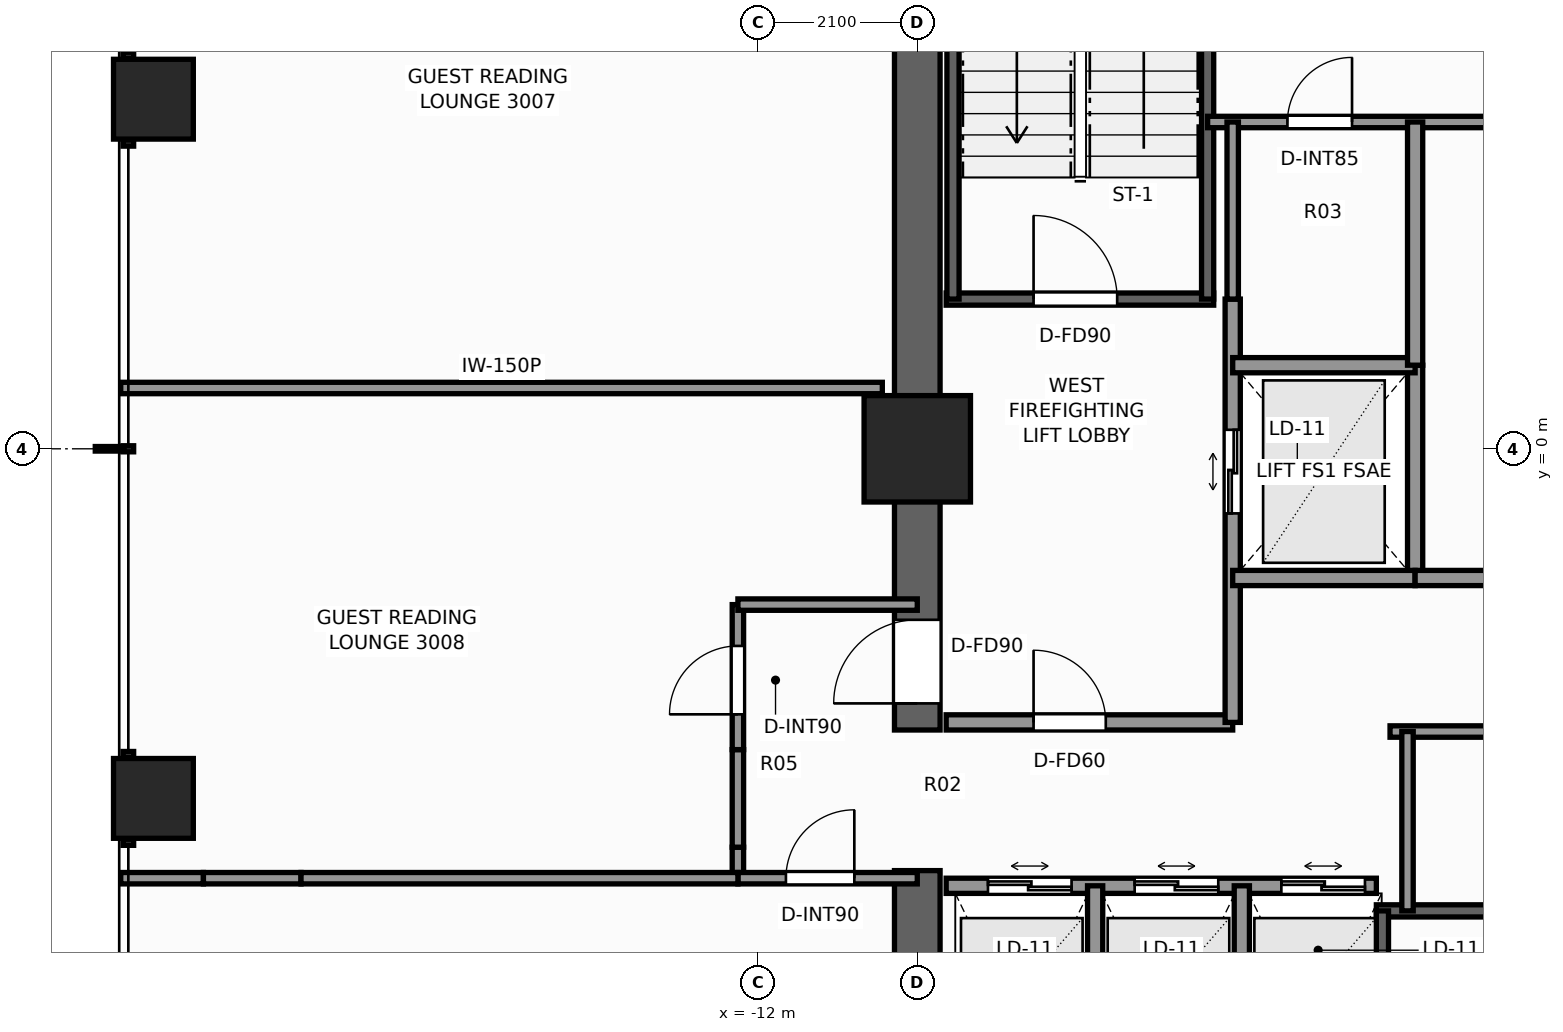
"""IFC4 building model, lengths in metres.
Left out: names, types, materials, properties, quantities, classifications, styles, units other than length and angle.
Written with IfcOpenShell. Run it as: python <this file> out.ifc"""

import sys

from ifc_helpers import new_model, si_unit, direction, frame, frame_2d, origin, origin_2d, place, context, subcontext, project, spatial, rectangle, extrude, element, fill, save


model = new_model("IFC4")
c1 = context("Model", 3, precision=1e-05, world=origin(), true_north=direction((0.0, 1.0)))
c2 = subcontext(c1, "Body", "Model", "MODEL_VIEW")
j1 = project(units=[si_unit("LENGTHUNIT", "METRE"), si_unit("PLANEANGLEUNIT", "RADIAN")], contexts=[c1])
p1 = place(None, origin())
s1 = spatial("IfcSite", under=j1, at=p1, CompositionType="ELEMENT")
p2 = place(p1, origin())
s2 = spatial("IfcBuilding", under=s1, at=p2, CompositionType="ELEMENT")
p3 = place(p2, frame((0.0, 0.0, 105.2)))
s3 = spatial("IfcBuildingStorey", under=s2, at=p3, CompositionType="ELEMENT", Elevation=105.2)
p4 = place(p3, frame((-9.9, -9.6, 0.0), z_axis=(0.0, 0.0, 1.0), x_axis=(0.0, 1.0, 0.0)))
e1 = element("IfcWall", 1, at=p4, inside=s3, PredefinedType="SHEAR", context=c2, shape_type="SweptSolid", body=[
    extrude(rectangle(XDim=4.05, YDim=0.6, at=frame_2d((2.025, 0.0))), origin(), (0.0, 0.0, 1.0), 3.3),
])
p5 = place(p3, frame((-9.9, -3.7, 0.0), z_axis=(0.0, 0.0, 1.0), x_axis=(0.0, 1.0, 0.0)))
e2 = element("IfcWall", 2, at=p5, inside=s3, PredefinedType="SHEAR", context=c2, shape_type="SweptSolid", body=[
    extrude(rectangle(XDim=13.3, YDim=0.6, at=frame_2d((6.65, 0.0))), origin(), (0.0, 0.0, 1.0), 3.3),
])
p6 = place(p5, frame((0.35, 0.0, 0.0)))
e3 = element("IfcOpeningElement", 3, at=p6, cuts=e2, PredefinedType="OPENING", context=c2, shape_type="SweptSolid", body=[
    extrude(rectangle(XDim=1.1, YDim=2.2, at=frame_2d((0.55, 1.1))), frame((0.0, 0.31, 0.0), z_axis=(0.0, -1.0, 0.0), x_axis=(1.0, 0.0, 0.0)), (0.0, 0.0, 1.0), 0.62),
])
p7 = place(p3, frame((-9.9, 0.0, 0.0), z_axis=(0.0, 0.0, 1.0), x_axis=(1.0, 0.0, 0.0)))
e4 = element("IfcColumn", 4, at=p7, inside=s3, PredefinedType="COLUMN", context=c2, shape_type="SweptSolid", body=[
    extrude(rectangle(XDim=1.4, YDim=1.4, at=origin_2d()), origin(), (0.0, 0.0, 1.0), 3.3),
])
for number, where, z_axis, x_axis in (
    (5, (-19.95, -4.6, 0.0), (0.0, 0.0, 1.0), (1.0, 0.0, 0.0)),
    (6, (-19.95, 4.6, 0.0), (0.0, 0.0, 1.0), (1.0, 0.0, 0.0)),
):
    element("IfcColumn", number, at=place(p3, frame(where, z_axis=z_axis, x_axis=x_axis)), inside=s3, PredefinedType="COLUMN", context=c2, shape_type="SweptSolid", body=[
        extrude(rectangle(XDim=1.05, YDim=1.05, at=origin_2d()), origin(), (0.0, 0.0, 1.0), 3.3),
    ])
p8 = place(p3, frame((-9.52, 1.97, 0.0), z_axis=(0.0, 0.0, 1.0), x_axis=(1.0, 0.0, 0.0)))
e7 = element("IfcWall", 7, at=p8, inside=s3, PredefinedType="SHEAR", context=c2, shape_type="SweptSolid", body=[
    extrude(rectangle(XDim=3.52, YDim=0.16, at=frame_2d((1.76, 0.0))), origin(), (0.0, 0.0, 1.0), 3.3),
])
p9 = place(p8, frame((1.15, 0.0, 0.0)))
e8 = element("IfcOpeningElement", 8, at=p9, cuts=e7, PredefinedType="OPENING", context=c2, shape_type="SweptSolid", body=[
    extrude(rectangle(XDim=1.1, YDim=2.2, at=frame_2d((0.55, 1.1))), frame((0.0, 0.09, 0.0), z_axis=(0.0, -1.0, 0.0), x_axis=(1.0, 0.0, 0.0)), (0.0, 0.0, 1.0), 0.18),
])
for number, where, z_axis, x_axis in (
    (9, (-9.43, 1.97, 0.0), (0.0, 0.0, 1.0), (0.0, 1.0, 0.0)),
    (10, (-6.08, 1.97, 0.0), (0.0, 0.0, 1.0), (0.0, 1.0, 0.0)),
):
    element("IfcWall", number, at=place(p3, frame(where, z_axis=z_axis, x_axis=x_axis)), inside=s3, PredefinedType="SHEAR", context=c2, shape_type="SweptSolid", body=[
        extrude(rectangle(XDim=7.56, YDim=0.16, at=frame_2d((3.78, 0.0))), origin(), (0.0, 0.0, 1.0), 3.3),
    ])
p10 = place(p3, frame((-3.86, -6.08, 0.0), z_axis=(0.0, 0.0, 1.0), x_axis=(1.0, 0.0, 0.0)))
e11 = element("IfcWall", 11, at=p10, inside=s3, PredefinedType="SHEAR", context=c2, shape_type="SweptSolid", body=[
    extrude(rectangle(XDim=7.72, YDim=0.16, at=frame_2d((3.86, 0.0))), origin(), (0.0, 0.0, 1.0), 3.3),
])
p11 = place(p3, frame((-3.78, -9.43, 0.0), z_axis=(0.0, 0.0, 1.0), x_axis=(0.0, 1.0, 0.0)))
e12 = element("IfcWall", 12, at=p11, inside=s3, PredefinedType="SHEAR", context=c2, shape_type="SweptSolid", body=[
    extrude(rectangle(XDim=3.35, YDim=0.16, at=frame_2d((1.675, 0.0))), origin(), (0.0, 0.0, 1.0), 3.3),
])
p12 = place(p3, frame((-9.52, -3.6, 0.0), z_axis=(0.0, 0.0, 1.0), x_axis=(1.0, 0.0, 0.0)))
e13 = element("IfcWall", 13, at=p12, inside=s3, PredefinedType="SOLIDWALL", context=c2, shape_type="SweptSolid", body=[
    extrude(rectangle(XDim=3.77, YDim=0.2, at=frame_2d((1.885, 0.0))), origin(), (0.0, 0.0, 1.0), 3.08),
])
p13 = place(p12, frame((1.15, 0.0, 0.0)))
e14 = element("IfcOpeningElement", 14, at=p13, cuts=e13, PredefinedType="OPENING", context=c2, shape_type="SweptSolid", body=[
    extrude(rectangle(XDim=0.95, YDim=2.06, at=frame_2d((0.475, 1.03))), frame((0.0, 0.11, 0.0), z_axis=(0.0, -1.0, 0.0), x_axis=(1.0, 0.0, 0.0)), (0.0, 0.0, 1.0), 0.22),
])
p14 = place(p3, frame((-5.75, -3.6, 0.0), z_axis=(0.0, 0.0, 1.0), x_axis=(0.0, 1.0, 0.0)))
e15 = element("IfcWall", 15, at=p14, inside=s3, PredefinedType="SOLIDWALL", context=c2, shape_type="SweptSolid", body=[
    extrude(rectangle(XDim=5.57, YDim=0.2, at=frame_2d((2.785, 0.0))), origin(), (0.0, 0.0, 1.0), 2.715),
])
p15 = place(p14, frame((2.75, 0.0, 0.0)))
e16 = element("IfcOpeningElement", 16, at=p15, cuts=e15, PredefinedType="OPENING", context=c2, shape_type="SweptSolid", body=[
    extrude(rectangle(XDim=1.1, YDim=2.2, at=frame_2d((0.55, 1.1))), frame((0.0, 0.11, 0.0), z_axis=(0.0, -1.0, 0.0), x_axis=(1.0, 0.0, 0.0)), (0.0, 0.0, 1.0), 0.22),
])
p16 = place(p3, frame((-3.35, -1.7, 0.0), z_axis=(0.0, 0.0, 1.0), x_axis=(0.0, 1.0, 0.0)))
e17 = element("IfcWall", 17, at=p16, inside=s3, PredefinedType="SOLIDWALL", context=c2, shape_type="SweptSolid", body=[
    extrude(rectangle(XDim=2.8, YDim=0.2, at=frame_2d((1.4, 0.0))), origin(), (0.0, 0.0, 1.0), 2.715),
])
for number, where, z_axis, x_axis in (
    (18, (-5.75, -1.7, 0.0), (0.0, 0.0, 1.0), (1.0, 0.0, 0.0)),
    (19, (-5.75, 1.1, 0.0), (0.0, 0.0, 1.0), (1.0, 0.0, 0.0)),
):
    element("IfcWall", number, at=place(p3, frame(where, z_axis=z_axis, x_axis=x_axis)), inside=s3, PredefinedType="SOLIDWALL", context=c2, shape_type="SweptSolid", body=[
        extrude(rectangle(XDim=2.4, YDim=0.2, at=frame_2d((1.2, 0.0))), origin(), (0.0, 0.0, 1.0), 3.08),
    ])
p17 = place(p3, frame((-6.08, 4.3, 0.0), z_axis=(0.0, 0.0, 1.0), x_axis=(1.0, 0.0, 0.0)))
e20 = element("IfcWall", 20, at=p17, inside=s3, PredefinedType="PARTITIONING", context=c2, shape_type="SweptSolid", body=[
    extrude(rectangle(XDim=6.3, YDim=0.15, at=frame_2d((3.15, 0.0))), origin(), (0.0, 0.0, 1.0), 3.08),
])
p18 = place(p17, frame((1.05, 0.0, 0.0)))
e21 = element("IfcOpeningElement", 21, at=p18, cuts=e20, PredefinedType="OPENING", context=c2, shape_type="SweptSolid", body=[
    extrude(rectangle(XDim=0.85, YDim=2.03, at=frame_2d((0.425, 1.015))), frame((0.0, 0.085, 0.0), z_axis=(0.0, -1.0, 0.0), x_axis=(1.0, 0.0, 0.0)), (0.0, 0.0, 1.0), 0.17),
])
p19 = place(p3, frame((-9.52, -5.75, 0.0), z_axis=(0.0, 0.0, 1.0), x_axis=(1.0, 0.0, 0.0)))
e22 = element("IfcWall", 22, at=p19, inside=s3, PredefinedType="SOLIDWALL", context=c2, shape_type="SweptSolid", body=[
    extrude(rectangle(XDim=5.66, YDim=0.2, at=frame_2d((2.83, 0.0))), origin(), (0.0, 0.0, 1.0), 3.08),
])
p20 = place(p19, frame((0.55, 0.0, 0.0)))
e23 = element("IfcOpeningElement", 23, at=p20, cuts=e22, PredefinedType="OPENING", context=c2, shape_type="SweptSolid", body=[
    extrude(rectangle(XDim=1.1, YDim=2.2, at=frame_2d((0.55, 1.1))), frame((0.0, 0.11, 0.0), z_axis=(0.0, -1.0, 0.0), x_axis=(1.0, 0.0, 0.0)), (0.0, 0.0, 1.0), 0.22),
])
p21 = place(p19, frame((2.48, 0.0, 0.0)))
e24 = element("IfcOpeningElement", 24, at=p21, cuts=e22, PredefinedType="OPENING", context=c2, shape_type="SweptSolid", body=[
    extrude(rectangle(XDim=1.1, YDim=2.2, at=frame_2d((0.55, 1.1))), frame((0.0, 0.11, 0.0), z_axis=(0.0, -1.0, 0.0), x_axis=(1.0, 0.0, 0.0)), (0.0, 0.0, 1.0), 0.22),
])
p22 = place(p19, frame((4.41, 0.0, 0.0)))
e25 = element("IfcOpeningElement", 25, at=p22, cuts=e22, PredefinedType="OPENING", context=c2, shape_type="SweptSolid", body=[
    extrude(rectangle(XDim=1.1, YDim=2.2, at=frame_2d((0.55, 1.1))), frame((0.0, 0.11, 0.0), z_axis=(0.0, -1.0, 0.0), x_axis=(1.0, 0.0, 0.0)), (0.0, 0.0, 1.0), 0.22),
])
for number, where, z_axis, x_axis in (
    (26, (-7.56, -9.52, 0.0), (0.0, 0.0, 1.0), (0.0, 1.0, 0.0)),
    (27, (-5.63, -9.52, 0.0), (0.0, 0.0, 1.0), (0.0, 1.0, 0.0)),
):
    element("IfcWall", number, at=place(p3, frame(where, z_axis=z_axis, x_axis=x_axis)), inside=s3, PredefinedType="SOLIDWALL", context=c2, shape_type="SweptSolid", body=[
        extrude(rectangle(XDim=3.77, YDim=0.2, at=frame_2d((1.885, 0.0))), origin(), (0.0, 0.0, 1.0), 3.08),
    ])
p23 = place(p3, frame((-3.35, -1.7, 0.0), z_axis=(0.0, 0.0, 1.0), x_axis=(1.0, 0.0, 0.0)))
e28 = element("IfcWall", 28, at=p23, inside=s3, PredefinedType="SOLIDWALL", context=c2, shape_type="SweptSolid", body=[
    extrude(rectangle(XDim=6.7, YDim=0.2, at=frame_2d((3.35, 0.0))), origin(), (0.0, 0.0, 1.0), 2.715),
])
p24 = place(p3, frame((-3.35, 1.1, 0.0), z_axis=(0.0, 0.0, 1.0), x_axis=(0.0, 1.0, 0.0)))
e29 = element("IfcWall", 29, at=p24, inside=s3, PredefinedType="SOLIDWALL", context=c2, shape_type="SweptSolid", body=[
    extrude(rectangle(XDim=3.2, YDim=0.2, at=frame_2d((1.6, 0.0))), origin(), (0.0, 0.0, 1.0), 2.715),
])
p25 = place(p3, frame((-3.68, -3.72, 0.0), z_axis=(0.0, 0.0, 1.0), x_axis=(1.0, 0.0, 0.0)))
e30 = element("IfcWall", 30, at=p25, inside=s3, PredefinedType="PARTITIONING", context=c2, shape_type="SweptSolid", body=[
    extrude(rectangle(XDim=7.36, YDim=0.15, at=frame_2d((3.68, 0.0))), origin(), (0.0, 0.0, 1.0), 3.08),
])
p26 = place(p3, frame((-3.45, -6.08, 0.0), z_axis=(0.0, 0.0, 1.0), x_axis=(0.0, 1.0, 0.0)))
e31 = element("IfcWall", 31, at=p26, inside=s3, PredefinedType="PARTITIONING", context=c2, shape_type="SweptSolid", body=[
    extrude(rectangle(XDim=2.36, YDim=0.15, at=frame_2d((1.18, 0.0))), origin(), (0.0, 0.0, 1.0), 3.08),
])
p27 = place(p3, frame((-5.75, 1.97, 0.0), z_axis=(0.0, 0.0, 1.0), x_axis=(0.0, 1.0, 0.0)))
e32 = element("IfcWall", 32, at=p27, inside=s3, PredefinedType="PARTITIONING", context=c2, shape_type="SweptSolid", body=[
    extrude(rectangle(XDim=2.33, YDim=0.15, at=frame_2d((1.165, 0.0))), origin(), (0.0, 0.0, 1.0), 2.715),
])
p28 = place(p3, frame((-12.26, -5.65, 0.0), z_axis=(0.0, 0.0, 1.0), x_axis=(0.0, 1.0, 0.0)))
e33 = element("IfcWall", 33, at=p28, inside=s3, PredefinedType="PARTITIONING", context=c2, shape_type="SweptSolid", body=[
    extrude(rectangle(XDim=0.408, YDim=0.15, at=frame_2d((0.204, 0.0))), origin(), (0.0, 0.0, 1.0), 3.08),
])
p29 = place(p3, frame((-12.26, -5.242, 0.0), z_axis=(0.0, 0.0, 1.0), x_axis=(0.0, 1.0, 0.0)))
e34 = element("IfcWall", 34, at=p29, inside=s3, PredefinedType="PARTITIONING", context=c2, shape_type="SweptSolid", body=[
    extrude(rectangle(XDim=1.284, YDim=0.15, at=frame_2d((0.642, 0.0))), origin(), (0.0, 0.0, 1.0), 1.265),
])
p30 = place(p3, frame((-12.26, -3.958, 0.0), z_axis=(0.0, 0.0, 1.0), x_axis=(0.0, 1.0, 0.0)))
e35 = element("IfcWall", 35, at=p30, inside=s3, PredefinedType="PARTITIONING", context=c2, shape_type="SweptSolid", body=[
    extrude(rectangle(XDim=1.908, YDim=0.15, at=frame_2d((0.954, 0.0))), origin(), (0.0, 0.0, 1.0), 2.369),
])
p31 = place(p30, frame((0.464, 0.0, 0.0)))
e36 = element("IfcOpeningElement", 36, at=p31, cuts=e35, PredefinedType="OPENING", context=c2, shape_type="SweptSolid", body=[
    extrude(rectangle(XDim=0.9, YDim=2.06, at=frame_2d((0.45, 1.03))), frame((0.0, 0.085, 0.0), z_axis=(0.0, -1.0, 0.0), x_axis=(1.0, 0.0, 0.0)), (0.0, 0.0, 1.0), 0.17),
])
p32 = place(p3, frame((-12.26, -2.05, 0.0), z_axis=(0.0, 0.0, 1.0), x_axis=(1.0, 0.0, 0.0)))
e37 = element("IfcWall", 37, at=p32, inside=s3, PredefinedType="PARTITIONING", context=c2, shape_type="SweptSolid", body=[
    extrude(rectangle(XDim=2.36, YDim=0.15, at=frame_2d((1.18, 0.0))), origin(), (0.0, 0.0, 1.0), 3.08),
])
p33 = place(p3, frame((-12.26, -5.65, 0.0), z_axis=(0.0, 0.0, 1.0), x_axis=(1.0, 0.0, 0.0)))
e38 = element("IfcWall", 38, at=p33, inside=s3, PredefinedType="PARTITIONING", context=c2, shape_type="SweptSolid", body=[
    extrude(rectangle(XDim=2.36, YDim=0.15, at=frame_2d((1.18, 0.0))), origin(), (0.0, 0.0, 1.0), 3.08),
])
p34 = place(p33, frame((0.632, 0.0, 0.0)))
e39 = element("IfcOpeningElement", 39, at=p34, cuts=e38, PredefinedType="OPENING", context=c2, shape_type="SweptSolid", body=[
    extrude(rectangle(XDim=0.9, YDim=2.06, at=frame_2d((0.45, 1.03))), frame((0.0, 0.085, 0.0), z_axis=(0.0, -1.0, 0.0), x_axis=(1.0, 0.0, 0.0)), (0.0, 0.0, 1.0), 0.17),
])
p35 = place(p3, frame((-20.38, 0.8, 0.0), z_axis=(0.0, 0.0, 1.0), x_axis=(1.0, 0.0, 0.0)))
e40 = element("IfcWall", 40, at=p35, inside=s3, PredefinedType="PARTITIONING", context=c2, shape_type="SweptSolid", body=[
    extrude(rectangle(XDim=10.02, YDim=0.15, at=frame_2d((5.01, 0.0))), origin(), (0.0, 0.0, 1.0), 2.449),
])
p36 = place(p3, frame((-20.38, -5.65, 0.0), z_axis=(0.0, 0.0, 1.0), x_axis=(1.0, 0.0, 0.0)))
e41 = element("IfcWall", 41, at=p36, inside=s3, PredefinedType="PARTITIONING", context=c2, shape_type="SweptSolid", body=[
    extrude(rectangle(XDim=1.088, YDim=0.15, at=frame_2d((0.544, 0.0))), origin(), (0.0, 0.0, 1.0), 2.449),
])
p37 = place(p3, frame((-19.292, -5.65, 0.0), z_axis=(0.0, 0.0, 1.0), x_axis=(1.0, 0.0, 0.0)))
e42 = element("IfcWall", 42, at=p37, inside=s3, PredefinedType="PARTITIONING", context=c2, shape_type="SweptSolid", body=[
    extrude(rectangle(XDim=1.284, YDim=0.15, at=frame_2d((0.642, 0.0))), origin(), (0.0, 0.0, 1.0), 1.265),
])
p38 = place(p3, frame((-18.008, -5.65, 0.0), z_axis=(0.0, 0.0, 1.0), x_axis=(1.0, 0.0, 0.0)))
e43 = element("IfcWall", 43, at=p38, inside=s3, PredefinedType="PARTITIONING", context=c2, shape_type="SweptSolid", body=[
    extrude(rectangle(XDim=5.748, YDim=0.15, at=frame_2d((2.874, 0.0))), origin(), (0.0, 0.0, 1.0), 3.08),
])
p39 = place(p9, origin())
e44 = element("IfcDoor", 44, at=p39, inside=s3, OperationType="SINGLE_SWING_LEFT", PredefinedType="DOOR", context=c2, shape_type="SweptSolid", body=[
    extrude(rectangle(XDim=1.1, YDim=2.2, at=frame_2d((0.55, 1.1))), frame((0.0, 0.025, 0.0), z_axis=(0.0, -1.0, 0.0), x_axis=(1.0, 0.0, 0.0)), (0.0, 0.0, 1.0), 0.05),
])
fill(e8, e44)
p40 = place(p6, origin())
e45 = element("IfcDoor", 45, at=p40, inside=s3, OperationType="SINGLE_SWING_LEFT", PredefinedType="DOOR", context=c2, shape_type="SweptSolid", body=[
    extrude(rectangle(XDim=1.1, YDim=2.2, at=frame_2d((0.55, 1.1))), frame((0.0, 0.025, 0.0), z_axis=(0.0, -1.0, 0.0), x_axis=(1.0, 0.0, 0.0)), (0.0, 0.0, 1.0), 0.05),
])
fill(e3, e45)
p41 = place(p15, origin())
e46 = element("IfcDoor", 46, at=p41, inside=s3, OperationType="DOUBLE_DOOR_SLIDING", PredefinedType="DOOR", context=c2, shape_type="SweptSolid", body=[
    extrude(rectangle(XDim=1.1, YDim=2.2, at=frame_2d((0.55, 1.1))), frame((0.0, 0.025, 0.0), z_axis=(0.0, -1.0, 0.0), x_axis=(1.0, 0.0, 0.0)), (0.0, 0.0, 1.0), 0.05),
])
fill(e16, e46)
p42 = place(p20, origin())
e47 = element("IfcDoor", 47, at=p42, inside=s3, OperationType="DOUBLE_DOOR_SLIDING", PredefinedType="DOOR", context=c2, shape_type="SweptSolid", body=[
    extrude(rectangle(XDim=1.1, YDim=2.2, at=frame_2d((0.55, 1.1))), frame((0.0, 0.025, 0.0), z_axis=(0.0, -1.0, 0.0), x_axis=(1.0, 0.0, 0.0)), (0.0, 0.0, 1.0), 0.05),
])
fill(e23, e47)
p43 = place(p21, origin())
e48 = element("IfcDoor", 48, at=p43, inside=s3, OperationType="DOUBLE_DOOR_SLIDING", PredefinedType="DOOR", context=c2, shape_type="SweptSolid", body=[
    extrude(rectangle(XDim=1.1, YDim=2.2, at=frame_2d((0.55, 1.1))), frame((0.0, 0.025, 0.0), z_axis=(0.0, -1.0, 0.0), x_axis=(1.0, 0.0, 0.0)), (0.0, 0.0, 1.0), 0.05),
])
fill(e24, e48)
p44 = place(p22, origin())
e49 = element("IfcDoor", 49, at=p44, inside=s3, OperationType="DOUBLE_DOOR_SLIDING", PredefinedType="DOOR", context=c2, shape_type="SweptSolid", body=[
    extrude(rectangle(XDim=1.1, YDim=2.2, at=frame_2d((0.55, 1.1))), frame((0.0, 0.025, 0.0), z_axis=(0.0, -1.0, 0.0), x_axis=(1.0, 0.0, 0.0)), (0.0, 0.0, 1.0), 0.05),
])
fill(e25, e49)
p45 = place(p13, origin())
e50 = element("IfcDoor", 50, at=p45, inside=s3, OperationType="SINGLE_SWING_LEFT", PredefinedType="DOOR", context=c2, shape_type="SweptSolid", body=[
    extrude(rectangle(XDim=0.95, YDim=2.06, at=frame_2d((0.475, 1.03))), frame((0.0, 0.025, 0.0), z_axis=(0.0, -1.0, 0.0), x_axis=(1.0, 0.0, 0.0)), (0.0, 0.0, 1.0), 0.05),
])
fill(e14, e50)
p46 = place(p18, origin())
e51 = element("IfcDoor", 51, at=p46, inside=s3, OperationType="SINGLE_SWING_RIGHT", PredefinedType="DOOR", context=c2, shape_type="SweptSolid", body=[
    extrude(rectangle(XDim=0.85, YDim=2.03, at=frame_2d((0.425, 1.015))), frame((0.0, 0.025, 0.0), z_axis=(0.0, -1.0, 0.0), x_axis=(1.0, 0.0, 0.0)), (0.0, 0.0, 1.0), 0.05),
])
fill(e21, e51)
p47 = place(p31, origin())
e52 = element("IfcDoor", 52, at=p47, inside=s3, OperationType="SINGLE_SWING_LEFT", PredefinedType="DOOR", context=c2, shape_type="SweptSolid", body=[
    extrude(rectangle(XDim=0.9, YDim=2.06, at=frame_2d((0.45, 1.03))), frame((0.0, 0.025, 0.0), z_axis=(0.0, -1.0, 0.0), x_axis=(1.0, 0.0, 0.0)), (0.0, 0.0, 1.0), 0.05),
])
fill(e36, e52)
p48 = place(p34, origin())
e53 = element("IfcDoor", 53, at=p48, inside=s3, OperationType="SINGLE_SWING_RIGHT", PredefinedType="DOOR", context=c2, shape_type="SweptSolid", body=[
    extrude(rectangle(XDim=0.9, YDim=2.06, at=frame_2d((0.45, 1.03))), frame((0.0, 0.025, 0.0), z_axis=(0.0, -1.0, 0.0), x_axis=(1.0, 0.0, 0.0)), (0.0, 0.0, 1.0), 0.05),
])
fill(e39, e53)
save(model, sys.argv[1])
